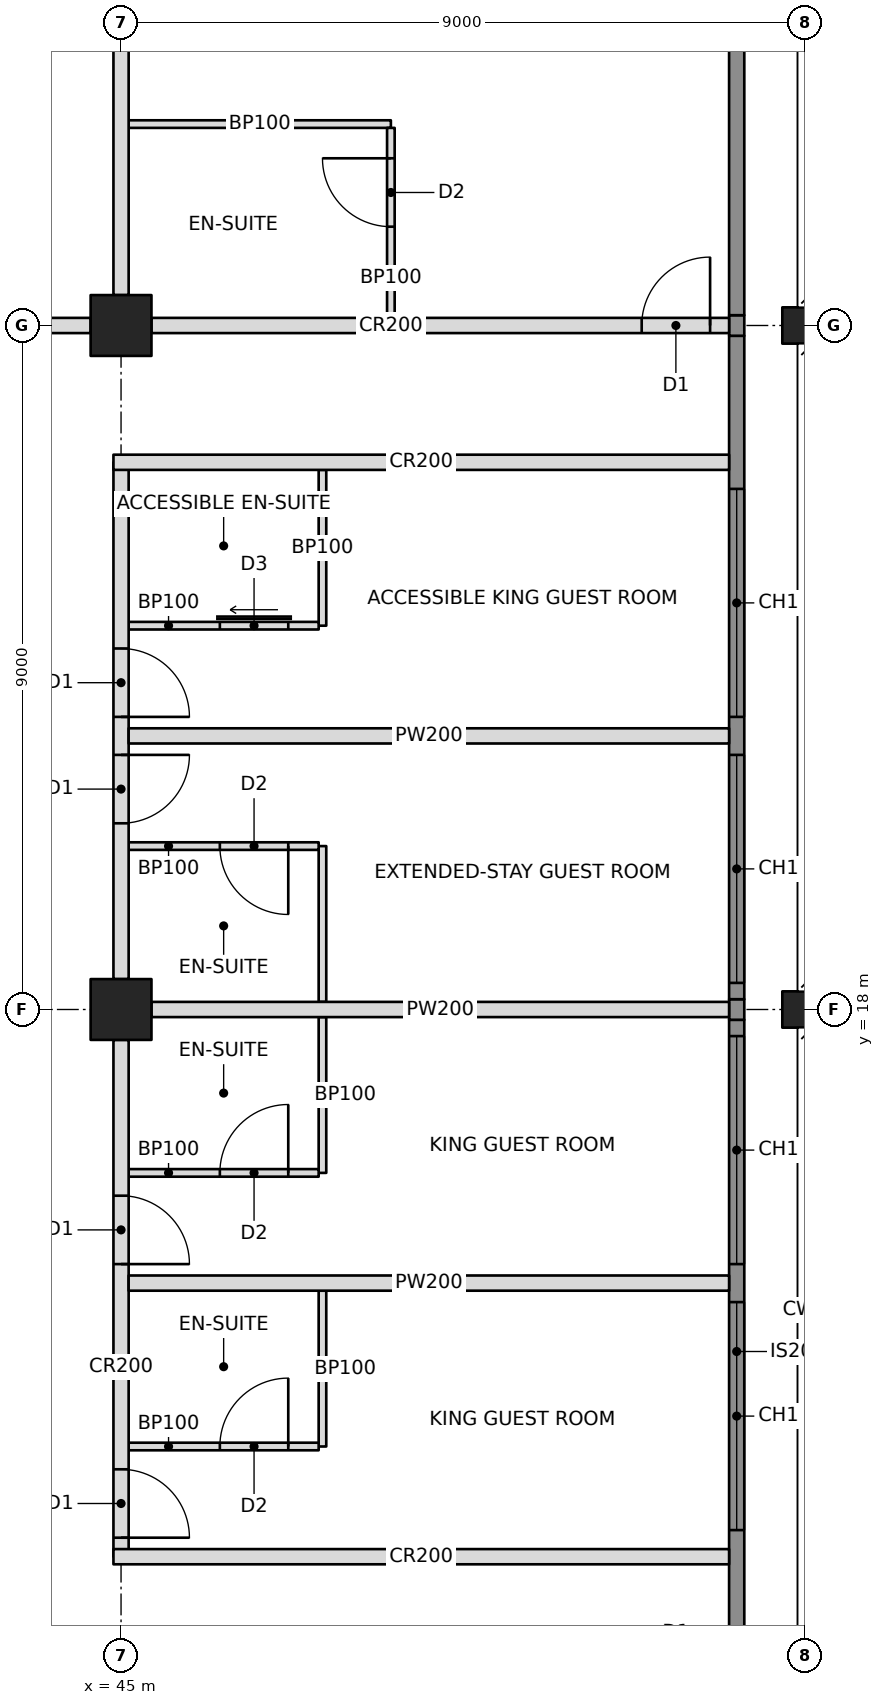
"""IFC4 building model, lengths in metres.
Left out: names, types, materials, properties, quantities, classifications, styles, units other than length and angle.
Written with IfcOpenShell. Run it as: python <this file> out.ifc"""

import sys

from ifc_helpers import new_model, si_unit, direction, frame, frame_2d, origin, origin_2d, place, context, subcontext, project, spatial, rectangle, hollow_rectangle, i_section, extrude, element, fill, save


model = new_model("IFC4")
c1 = context("Model", 3, precision=1e-05, world=origin(), true_north=direction((0.0, 1.0)))
c2 = subcontext(c1, "Body", "Model", "MODEL_VIEW")
j1 = project(units=[si_unit("LENGTHUNIT", "METRE"), si_unit("PLANEANGLEUNIT", "RADIAN")], contexts=[c1])
p1 = place(None, origin())
s1 = spatial("IfcSite", under=j1, at=p1, CompositionType="ELEMENT")
p2 = place(p1, origin())
s2 = spatial("IfcBuilding", under=s1, at=p2, CompositionType="ELEMENT")
p3 = place(p2, frame((0.0, 0.0, 51.8)))
s3 = spatial("IfcBuildingStorey", under=s2, at=p3, CompositionType="ELEMENT", Elevation=51.8)
for number, where, z_axis, x_axis in (
    (1, (45.0, 18.0, 0.0), (0.0, 0.0, 1.0), (0.0, 1.0, 0.0)),
    (2, (45.0, 27.0, 0.0), (0.0, 0.0, 1.0), (0.0, 1.0, 0.0)),
):
    element("IfcColumn", number, at=place(p3, frame(where, z_axis=z_axis, x_axis=x_axis)), inside=s3, PredefinedType="COLUMN", context=c2, shape_type="SweptSolid", body=[
        extrude(hollow_rectangle(XDim=0.8, YDim=0.8, WallThickness=0.1, at=origin_2d()), origin(), (0.0, 0.0, 1.0), 3.4),
    ])
for number, where, z_axis, x_axis in (
    (3, (54.0, 18.0, 0.0), (0.0, 0.0, 1.0), (0.0, 1.0, 0.0)),
    (4, (54.0, 27.0, 0.0), (0.0, 0.0, 1.0), (0.0, 1.0, 0.0)),
):
    element("IfcColumn", number, at=place(p3, frame(where, z_axis=z_axis, x_axis=x_axis)), inside=s3, PredefinedType="COLUMN", context=c2, shape_type="SweptSolid", body=[
        extrude(i_section(OverallWidth=0.478, OverallDepth=0.599, WebThickness=0.1, FlangeThickness=0.14, at=origin_2d()), origin(), (0.0, 0.0, 1.0), 3.4),
    ])
p4 = place(p3, frame((36.4, 27.0, 0.0), z_axis=(0.0, 0.0, 1.0), x_axis=(1.0, 0.0, 0.0)))
e5 = element("IfcWall", 5, at=p4, inside=s3, PredefinedType="PARTITIONING", context=c2, shape_type="SweptSolid", body=[
    extrude(rectangle(XDim=8.2, YDim=0.2, at=frame_2d((4.1, 0.0))), origin(), (0.0, 0.0, 1.0), 2.438),
])
p5 = place(p4, frame((4.35, 0.0, 0.0)))
e6 = element("IfcOpeningElement", 6, at=p5, cuts=e5, PredefinedType="OPENING", context=c2, shape_type="SweptSolid", body=[
    extrude(rectangle(XDim=1.0, YDim=2.1, at=frame_2d((0.5, 1.05))), frame((0.0, 0.11, 0.0), z_axis=(0.0, -1.0, 0.0), x_axis=(1.0, 0.0, 0.0)), (0.0, 0.0, 1.0), 0.22),
])
p6 = place(p3, frame((45.4, 27.0, 0.0), z_axis=(0.0, 0.0, 1.0), x_axis=(1.0, 0.0, 0.0)))
e7 = element("IfcWall", 7, at=p6, inside=s3, PredefinedType="PARTITIONING", context=c2, shape_type="SweptSolid", body=[
    extrude(rectangle(XDim=7.6, YDim=0.2, at=frame_2d((3.8, 0.0))), origin(), (0.0, 0.0, 1.0), 2.438),
])
p7 = place(p6, frame((6.45, 0.0, 0.0)))
e8 = element("IfcOpeningElement", 8, at=p7, cuts=e7, PredefinedType="OPENING", context=c2, shape_type="SweptSolid", body=[
    extrude(rectangle(XDim=0.9, YDim=2.1, at=frame_2d((0.45, 1.05))), frame((0.0, 0.11, 0.0), z_axis=(0.0, -1.0, 0.0), x_axis=(1.0, 0.0, 0.0)), (0.0, 0.0, 1.0), 0.22),
])
p8 = place(p3, frame((45.0, 10.8, 0.0), z_axis=(0.0, 0.0, 1.0), x_axis=(0.0, 1.0, 0.0)))
e9 = element("IfcWall", 9, at=p8, inside=s3, PredefinedType="PARTITIONING", context=c2, shape_type="SweptSolid", body=[
    extrude(rectangle(XDim=6.8, YDim=0.2, at=frame_2d((3.4, 0.0))), origin(), (0.0, 0.0, 1.0), 2.438),
])
p9 = place(p8, frame((0.25, 0.0, 0.0)))
e10 = element("IfcOpeningElement", 10, at=p9, cuts=e9, PredefinedType="OPENING", context=c2, shape_type="SweptSolid", body=[
    extrude(rectangle(XDim=0.9, YDim=2.1, at=frame_2d((0.45, 1.05))), frame((0.0, 0.11, 0.0), z_axis=(0.0, -1.0, 0.0), x_axis=(1.0, 0.0, 0.0)), (0.0, 0.0, 1.0), 0.22),
])
p10 = place(p8, frame((3.85, 0.0, 0.0)))
e11 = element("IfcOpeningElement", 11, at=p10, cuts=e9, PredefinedType="OPENING", context=c2, shape_type="SweptSolid", body=[
    extrude(rectangle(XDim=0.9, YDim=2.1, at=frame_2d((0.45, 1.05))), frame((0.0, 0.11, 0.0), z_axis=(0.0, -1.0, 0.0), x_axis=(1.0, 0.0, 0.0)), (0.0, 0.0, 1.0), 0.22),
])
p11 = place(p3, frame((45.0, 18.4, 0.0), z_axis=(0.0, 0.0, 1.0), x_axis=(0.0, 1.0, 0.0)))
e12 = element("IfcWall", 12, at=p11, inside=s3, PredefinedType="PARTITIONING", context=c2, shape_type="SweptSolid", body=[
    extrude(rectangle(XDim=6.8, YDim=0.2, at=frame_2d((3.4, 0.0))), origin(), (0.0, 0.0, 1.0), 2.438),
])
p12 = place(p11, frame((2.05, 0.0, 0.0)))
e13 = element("IfcOpeningElement", 13, at=p12, cuts=e12, PredefinedType="OPENING", context=c2, shape_type="SweptSolid", body=[
    extrude(rectangle(XDim=0.9, YDim=2.1, at=frame_2d((0.45, 1.05))), frame((0.0, 0.11, 0.0), z_axis=(0.0, -1.0, 0.0), x_axis=(1.0, 0.0, 0.0)), (0.0, 0.0, 1.0), 0.22),
])
p13 = place(p11, frame((3.45, 0.0, 0.0)))
e14 = element("IfcOpeningElement", 14, at=p13, cuts=e12, PredefinedType="OPENING", context=c2, shape_type="SweptSolid", body=[
    extrude(rectangle(XDim=0.9, YDim=2.1, at=frame_2d((0.45, 1.05))), frame((0.0, 0.11, 0.0), z_axis=(0.0, -1.0, 0.0), x_axis=(1.0, 0.0, 0.0)), (0.0, 0.0, 1.0), 0.22),
])
for number, where, z_axis, x_axis in (
    (15, (44.9, 10.8, 0.0), (0.0, 0.0, 1.0), (1.0, 0.0, 0.0)),
    (16, (44.9, 25.2, 0.0), (0.0, 0.0, 1.0), (1.0, 0.0, 0.0)),
):
    element("IfcWall", number, at=place(p3, frame(where, z_axis=z_axis, x_axis=x_axis)), inside=s3, PredefinedType="PARTITIONING", context=c2, shape_type="SweptSolid", body=[
        extrude(rectangle(XDim=8.1, YDim=0.2, at=frame_2d((4.05, 0.0))), origin(), (0.0, 0.0, 1.0), 2.438),
    ])
p14 = place(p3, frame((45.0, 27.4, 0.0), z_axis=(0.0, 0.0, 1.0), x_axis=(0.0, 1.0, 0.0)))
e17 = element("IfcWall", 17, at=p14, inside=s3, PredefinedType="PARTITIONING", context=c2, shape_type="SweptSolid", body=[
    extrude(rectangle(XDim=7.6, YDim=0.2, at=frame_2d((3.8, 0.0))), origin(), (0.0, 0.0, 1.0), 2.438),
])
p15 = place(p3, frame((45.1, 29.65, 0.0), z_axis=(0.0, 0.0, 1.0), x_axis=(1.0, 0.0, 0.0)))
e18 = element("IfcWall", 18, at=p15, inside=s3, PredefinedType="PARTITIONING", context=c2, shape_type="SweptSolid", body=[
    extrude(rectangle(XDim=3.45, YDim=0.1, at=frame_2d((1.725, 0.0))), origin(), (0.0, 0.0, 1.0), 2.438),
])
p16 = place(p3, frame((48.55, 27.1, 0.0), z_axis=(0.0, 0.0, 1.0), x_axis=(0.0, 1.0, 0.0)))
e19 = element("IfcWall", 19, at=p16, inside=s3, PredefinedType="PARTITIONING", context=c2, shape_type="SweptSolid", body=[
    extrude(rectangle(XDim=2.5, YDim=0.1, at=frame_2d((1.25, 0.0))), origin(), (0.0, 0.0, 1.0), 2.438),
])
p17 = place(p16, frame((1.2, 0.0, 0.0)))
e20 = element("IfcOpeningElement", 20, at=p17, cuts=e19, PredefinedType="OPENING", context=c2, shape_type="SweptSolid", body=[
    extrude(rectangle(XDim=0.9, YDim=2.1, at=frame_2d((0.45, 1.05))), frame((0.0, 0.06, 0.0), z_axis=(0.0, -1.0, 0.0), x_axis=(1.0, 0.0, 0.0)), (0.0, 0.0, 1.0), 0.12),
])
p18 = place(p3, frame((45.1, 14.4, 0.0), z_axis=(0.0, 0.0, 1.0), x_axis=(1.0, 0.0, 0.0)))
e21 = element("IfcWall", 21, at=p18, inside=s3, PredefinedType="PARTITIONING", context=c2, shape_type="SweptSolid", body=[
    extrude(rectangle(XDim=7.9, YDim=0.2, at=frame_2d((3.95, 0.0))), origin(), (0.0, 0.0, 1.0), 2.438),
])
p19 = place(p3, frame((45.4, 18.0, 0.0), z_axis=(0.0, 0.0, 1.0), x_axis=(1.0, 0.0, 0.0)))
e22 = element("IfcWall", 22, at=p19, inside=s3, PredefinedType="PARTITIONING", context=c2, shape_type="SweptSolid", body=[
    extrude(rectangle(XDim=7.6, YDim=0.2, at=frame_2d((3.8, 0.0))), origin(), (0.0, 0.0, 1.0), 2.438),
])
p20 = place(p3, frame((45.1, 21.6, 0.0), z_axis=(0.0, 0.0, 1.0), x_axis=(1.0, 0.0, 0.0)))
e23 = element("IfcWall", 23, at=p20, inside=s3, PredefinedType="PARTITIONING", context=c2, shape_type="SweptSolid", body=[
    extrude(rectangle(XDim=7.9, YDim=0.2, at=frame_2d((3.95, 0.0))), origin(), (0.0, 0.0, 1.0), 2.438),
])
p21 = place(p3, frame((47.65, 12.25, 0.0), z_axis=(0.0, 0.0, 1.0), x_axis=(0.0, 1.0, 0.0)))
e24 = element("IfcWall", 24, at=p21, inside=s3, PredefinedType="PARTITIONING", context=c2, shape_type="SweptSolid", body=[
    extrude(rectangle(XDim=2.05, YDim=0.1, at=frame_2d((1.025, 0.0))), origin(), (0.0, 0.0, 1.0), 3.2),
])
p22 = place(p3, frame((45.1, 12.25, 0.0), z_axis=(0.0, 0.0, 1.0), x_axis=(1.0, 0.0, 0.0)))
e25 = element("IfcWall", 25, at=p22, inside=s3, PredefinedType="PARTITIONING", context=c2, shape_type="SweptSolid", body=[
    extrude(rectangle(XDim=2.5, YDim=0.1, at=frame_2d((1.25, 0.0))), origin(), (0.0, 0.0, 1.0), 2.438),
])
p23 = place(p22, frame((1.2, 0.0, 0.0)))
e26 = element("IfcOpeningElement", 26, at=p23, cuts=e25, PredefinedType="OPENING", context=c2, shape_type="SweptSolid", body=[
    extrude(rectangle(XDim=0.9, YDim=2.1, at=frame_2d((0.45, 1.05))), frame((0.0, 0.06, 0.0), z_axis=(0.0, -1.0, 0.0), x_axis=(1.0, 0.0, 0.0)), (0.0, 0.0, 1.0), 0.12),
])
p24 = place(p3, frame((47.65, 15.85, 0.0), z_axis=(0.0, 0.0, 1.0), x_axis=(0.0, 1.0, 0.0)))
e27 = element("IfcWall", 27, at=p24, inside=s3, PredefinedType="PARTITIONING", context=c2, shape_type="SweptSolid", body=[
    extrude(rectangle(XDim=2.05, YDim=0.1, at=frame_2d((1.025, 0.0))), origin(), (0.0, 0.0, 1.0), 2.438),
])
p25 = place(p3, frame((45.1, 15.85, 0.0), z_axis=(0.0, 0.0, 1.0), x_axis=(1.0, 0.0, 0.0)))
e28 = element("IfcWall", 28, at=p25, inside=s3, PredefinedType="PARTITIONING", context=c2, shape_type="SweptSolid", body=[
    extrude(rectangle(XDim=2.5, YDim=0.1, at=frame_2d((1.25, 0.0))), origin(), (0.0, 0.0, 1.0), 2.438),
])
p26 = place(p25, frame((1.2, 0.0, 0.0)))
e29 = element("IfcOpeningElement", 29, at=p26, cuts=e28, PredefinedType="OPENING", context=c2, shape_type="SweptSolid", body=[
    extrude(rectangle(XDim=0.9, YDim=2.1, at=frame_2d((0.45, 1.05))), frame((0.0, 0.06, 0.0), z_axis=(0.0, -1.0, 0.0), x_axis=(1.0, 0.0, 0.0)), (0.0, 0.0, 1.0), 0.12),
])
p27 = place(p3, frame((47.65, 18.1, 0.0), z_axis=(0.0, 0.0, 1.0), x_axis=(0.0, 1.0, 0.0)))
e30 = element("IfcWall", 30, at=p27, inside=s3, PredefinedType="PARTITIONING", context=c2, shape_type="SweptSolid", body=[
    extrude(rectangle(XDim=2.05, YDim=0.1, at=frame_2d((1.025, 0.0))), origin(), (0.0, 0.0, 1.0), 2.438),
])
p28 = place(p3, frame((45.1, 20.15, 0.0), z_axis=(0.0, 0.0, 1.0), x_axis=(1.0, 0.0, 0.0)))
e31 = element("IfcWall", 31, at=p28, inside=s3, PredefinedType="PARTITIONING", context=c2, shape_type="SweptSolid", body=[
    extrude(rectangle(XDim=2.5, YDim=0.1, at=frame_2d((1.25, 0.0))), origin(), (0.0, 0.0, 1.0), 2.438),
])
p29 = place(p28, frame((1.2, 0.0, 0.0)))
e32 = element("IfcOpeningElement", 32, at=p29, cuts=e31, PredefinedType="OPENING", context=c2, shape_type="SweptSolid", body=[
    extrude(rectangle(XDim=0.9, YDim=2.1, at=frame_2d((0.45, 1.05))), frame((0.0, 0.06, 0.0), z_axis=(0.0, -1.0, 0.0), x_axis=(1.0, 0.0, 0.0)), (0.0, 0.0, 1.0), 0.12),
])
p30 = place(p3, frame((47.65, 23.05, 0.0), z_axis=(0.0, 0.0, 1.0), x_axis=(0.0, 1.0, 0.0)))
e33 = element("IfcWall", 33, at=p30, inside=s3, PredefinedType="PARTITIONING", context=c2, shape_type="SweptSolid", body=[
    extrude(rectangle(XDim=2.05, YDim=0.1, at=frame_2d((1.025, 0.0))), origin(), (0.0, 0.0, 1.0), 3.2),
])
p31 = place(p3, frame((45.1, 23.05, 0.0), z_axis=(0.0, 0.0, 1.0), x_axis=(1.0, 0.0, 0.0)))
e34 = element("IfcWall", 34, at=p31, inside=s3, PredefinedType="PARTITIONING", context=c2, shape_type="SweptSolid", body=[
    extrude(rectangle(XDim=2.5, YDim=0.1, at=frame_2d((1.25, 0.0))), origin(), (0.0, 0.0, 1.0), 2.438),
])
p32 = place(p31, frame((1.2, 0.0, 0.0)))
e35 = element("IfcOpeningElement", 35, at=p32, cuts=e34, PredefinedType="OPENING", context=c2, shape_type="SweptSolid", body=[
    extrude(rectangle(XDim=0.9, YDim=2.1, at=frame_2d((0.45, 1.05))), frame((0.0, 0.06, 0.0), z_axis=(0.0, -1.0, 0.0), x_axis=(1.0, 0.0, 0.0)), (0.0, 0.0, 1.0), 0.12),
])
p33 = place(p3, frame((53.1, 9.135, 0.0), z_axis=(0.0, 0.0, 1.0), x_axis=(0.0, 1.0, 0.0)))
e36 = element("IfcWall", 36, at=p33, inside=s3, PredefinedType="SOLIDWALL", context=c2, shape_type="SweptSolid", body=[
    extrude(rectangle(XDim=8.729, YDim=0.2, at=frame_2d((4.365, 0.0))), origin(), (0.0, 0.0, 1.0), 3.2),
])
p34 = place(p33, frame((2.015, 0.0, 0.6)))
e37 = element("IfcOpeningElement", 37, at=p34, cuts=e36, PredefinedType="OPENING", context=c2, shape_type="SweptSolid", body=[
    extrude(rectangle(XDim=3.0, YDim=2.2, at=frame_2d((1.5, 1.1))), frame((0.0, 0.11, 0.0), z_axis=(0.0, -1.0, 0.0), x_axis=(1.0, 0.0, 0.0)), (0.0, 0.0, 1.0), 0.22),
])
p35 = place(p33, frame((5.515, 0.0, 0.6)))
e38 = element("IfcOpeningElement", 38, at=p35, cuts=e36, PredefinedType="OPENING", context=c2, shape_type="SweptSolid", body=[
    extrude(rectangle(XDim=3.0, YDim=2.2, at=frame_2d((1.5, 1.1))), frame((0.0, 0.11, 0.0), z_axis=(0.0, -1.0, 0.0), x_axis=(1.0, 0.0, 0.0)), (0.0, 0.0, 1.0), 0.22),
])
p36 = place(p3, frame((53.1, 17.865, 0.0), z_axis=(0.0, 0.0, 1.0), x_axis=(0.0, 1.0, 0.0)))
e39 = element("IfcWall", 39, at=p36, inside=s3, PredefinedType="SOLIDWALL", context=c2, shape_type="SweptSolid", body=[
    extrude(rectangle(XDim=0.271, YDim=0.2, at=frame_2d((0.135, 0.0))), origin(), (0.0, 0.0, 1.0), 2.438),
])
p37 = place(p3, frame((53.1, 18.135, 0.0), z_axis=(0.0, 0.0, 1.0), x_axis=(0.0, 1.0, 0.0)))
e40 = element("IfcWall", 40, at=p37, inside=s3, PredefinedType="SOLIDWALL", context=c2, shape_type="SweptSolid", body=[
    extrude(rectangle(XDim=8.729, YDim=0.2, at=frame_2d((4.365, 0.0))), origin(), (0.0, 0.0, 1.0), 3.2),
])
p38 = place(p37, frame((0.215, 0.0, 0.6)))
e41 = element("IfcOpeningElement", 41, at=p38, cuts=e40, PredefinedType="OPENING", context=c2, shape_type="SweptSolid", body=[
    extrude(rectangle(XDim=3.0, YDim=2.2, at=frame_2d((1.5, 1.1))), frame((0.0, 0.11, 0.0), z_axis=(0.0, -1.0, 0.0), x_axis=(1.0, 0.0, 0.0)), (0.0, 0.0, 1.0), 0.22),
])
p39 = place(p37, frame((3.715, 0.0, 0.6)))
e42 = element("IfcOpeningElement", 42, at=p39, cuts=e40, PredefinedType="OPENING", context=c2, shape_type="SweptSolid", body=[
    extrude(rectangle(XDim=3.0, YDim=2.2, at=frame_2d((1.5, 1.1))), frame((0.0, 0.11, 0.0), z_axis=(0.0, -1.0, 0.0), x_axis=(1.0, 0.0, 0.0)), (0.0, 0.0, 1.0), 0.22),
])
p40 = place(p3, frame((53.1, 26.865, 0.0), z_axis=(0.0, 0.0, 1.0), x_axis=(0.0, 1.0, 0.0)))
e43 = element("IfcWall", 43, at=p40, inside=s3, PredefinedType="SOLIDWALL", context=c2, shape_type="SweptSolid", body=[
    extrude(rectangle(XDim=0.271, YDim=0.2, at=frame_2d((0.135, 0.0))), origin(), (0.0, 0.0, 1.0), 2.438),
])
p41 = place(p3, frame((53.1, 27.135, 0.0), z_axis=(0.0, 0.0, 1.0), x_axis=(0.0, 1.0, 0.0)))
e44 = element("IfcWall", 44, at=p41, inside=s3, PredefinedType="SOLIDWALL", context=c2, shape_type="SweptSolid", body=[
    extrude(rectangle(XDim=4.257, YDim=0.2, at=frame_2d((2.129, 0.0))), origin(), (0.0, 0.0, 1.0), 3.2),
])
p42 = place(p34, origin())
e45 = element("IfcWindow", 45, at=p42, inside=s3, PartitioningType="TRIPLE_PANEL_VERTICAL", PredefinedType="WINDOW", context=c2, shape_type="SweptSolid", body=[
    extrude(rectangle(XDim=3.0, YDim=2.2, at=frame_2d((1.5, 1.1))), frame((0.0, 0.03, 0.0), z_axis=(0.0, -1.0, 0.0), x_axis=(1.0, 0.0, 0.0)), (0.0, 0.0, 1.0), 0.06),
])
fill(e37, e45)
p43 = place(p35, origin())
e46 = element("IfcWindow", 46, at=p43, inside=s3, PartitioningType="TRIPLE_PANEL_VERTICAL", PredefinedType="WINDOW", context=c2, shape_type="SweptSolid", body=[
    extrude(rectangle(XDim=3.0, YDim=2.2, at=frame_2d((1.5, 1.1))), frame((0.0, 0.03, 0.0), z_axis=(0.0, -1.0, 0.0), x_axis=(1.0, 0.0, 0.0)), (0.0, 0.0, 1.0), 0.06),
])
fill(e38, e46)
p44 = place(p38, origin())
e47 = element("IfcWindow", 47, at=p44, inside=s3, PartitioningType="TRIPLE_PANEL_VERTICAL", PredefinedType="WINDOW", context=c2, shape_type="SweptSolid", body=[
    extrude(rectangle(XDim=3.0, YDim=2.2, at=frame_2d((1.5, 1.1))), frame((0.0, 0.03, 0.0), z_axis=(0.0, -1.0, 0.0), x_axis=(1.0, 0.0, 0.0)), (0.0, 0.0, 1.0), 0.06),
])
fill(e41, e47)
p45 = place(p39, origin())
e48 = element("IfcWindow", 48, at=p45, inside=s3, PartitioningType="TRIPLE_PANEL_VERTICAL", PredefinedType="WINDOW", context=c2, shape_type="SweptSolid", body=[
    extrude(rectangle(XDim=3.0, YDim=2.2, at=frame_2d((1.5, 1.1))), frame((0.0, 0.03, 0.0), z_axis=(0.0, -1.0, 0.0), x_axis=(1.0, 0.0, 0.0)), (0.0, 0.0, 1.0), 0.06),
])
fill(e42, e48)
p46 = place(p17, origin())
e49 = element("IfcDoor", 49, at=p46, inside=s3, OperationType="SINGLE_SWING_RIGHT", PredefinedType="DOOR", context=c2, shape_type="SweptSolid", body=[
    extrude(rectangle(XDim=0.9, YDim=2.1, at=frame_2d((0.45, 1.05))), frame((0.0, 0.025, 0.0), z_axis=(0.0, -1.0, 0.0), x_axis=(1.0, 0.0, 0.0)), (0.0, 0.0, 1.0), 0.05),
])
fill(e20, e49)
p47 = place(p7, origin())
e50 = element("IfcDoor", 50, at=p47, inside=s3, OperationType="SINGLE_SWING_RIGHT", PredefinedType="DOOR", context=c2, shape_type="SweptSolid", body=[
    extrude(rectangle(XDim=0.9, YDim=2.1, at=frame_2d((0.45, 1.05))), frame((0.0, 0.025, 0.0), z_axis=(0.0, -1.0, 0.0), x_axis=(1.0, 0.0, 0.0)), (0.0, 0.0, 1.0), 0.05),
])
fill(e8, e50)
p48 = place(p23, origin())
e51 = element("IfcDoor", 51, at=p48, inside=s3, OperationType="SINGLE_SWING_RIGHT", PredefinedType="DOOR", context=c2, shape_type="SweptSolid", body=[
    extrude(rectangle(XDim=0.9, YDim=2.1, at=frame_2d((0.45, 1.05))), frame((0.0, 0.025, 0.0), z_axis=(0.0, -1.0, 0.0), x_axis=(1.0, 0.0, 0.0)), (0.0, 0.0, 1.0), 0.05),
])
fill(e26, e51)
p49 = place(p9, frame((0.9, 0.0, 0.0), z_axis=(0.0, 0.0, 1.0), x_axis=(-1.0, 0.0, 0.0)))
e52 = element("IfcDoor", 52, at=p49, inside=s3, OperationType="SINGLE_SWING_RIGHT", PredefinedType="DOOR", context=c2, shape_type="SweptSolid", body=[
    extrude(rectangle(XDim=0.9, YDim=2.1, at=frame_2d((0.45, 1.05))), frame((0.0, 0.025, 0.0), z_axis=(0.0, -1.0, 0.0), x_axis=(1.0, 0.0, 0.0)), (0.0, 0.0, 1.0), 0.05),
])
fill(e10, e52)
p50 = place(p26, origin())
e53 = element("IfcDoor", 53, at=p50, inside=s3, OperationType="SINGLE_SWING_RIGHT", PredefinedType="DOOR", context=c2, shape_type="SweptSolid", body=[
    extrude(rectangle(XDim=0.9, YDim=2.1, at=frame_2d((0.45, 1.05))), frame((0.0, 0.025, 0.0), z_axis=(0.0, -1.0, 0.0), x_axis=(1.0, 0.0, 0.0)), (0.0, 0.0, 1.0), 0.05),
])
fill(e29, e53)
p51 = place(p10, frame((0.9, 0.0, 0.0), z_axis=(0.0, 0.0, 1.0), x_axis=(-1.0, 0.0, 0.0)))
e54 = element("IfcDoor", 54, at=p51, inside=s3, OperationType="SINGLE_SWING_RIGHT", PredefinedType="DOOR", context=c2, shape_type="SweptSolid", body=[
    extrude(rectangle(XDim=0.9, YDim=2.1, at=frame_2d((0.45, 1.05))), frame((0.0, 0.025, 0.0), z_axis=(0.0, -1.0, 0.0), x_axis=(1.0, 0.0, 0.0)), (0.0, 0.0, 1.0), 0.05),
])
fill(e11, e54)
p52 = place(p29, frame((0.9, 0.0, 0.0), z_axis=(0.0, 0.0, 1.0), x_axis=(-1.0, 0.0, 0.0)))
e55 = element("IfcDoor", 55, at=p52, inside=s3, OperationType="SINGLE_SWING_LEFT", PredefinedType="DOOR", context=c2, shape_type="SweptSolid", body=[
    extrude(rectangle(XDim=0.9, YDim=2.1, at=frame_2d((0.45, 1.05))), frame((0.0, 0.025, 0.0), z_axis=(0.0, -1.0, 0.0), x_axis=(1.0, 0.0, 0.0)), (0.0, 0.0, 1.0), 0.05),
])
fill(e32, e55)
p53 = place(p12, frame((0.9, 0.0, 0.0), z_axis=(0.0, 0.0, 1.0), x_axis=(-1.0, 0.0, 0.0)))
e56 = element("IfcDoor", 56, at=p53, inside=s3, OperationType="SINGLE_SWING_LEFT", PredefinedType="DOOR", context=c2, shape_type="SweptSolid", body=[
    extrude(rectangle(XDim=0.9, YDim=2.1, at=frame_2d((0.45, 1.05))), frame((0.0, 0.025, 0.0), z_axis=(0.0, -1.0, 0.0), x_axis=(1.0, 0.0, 0.0)), (0.0, 0.0, 1.0), 0.05),
])
fill(e13, e56)
p54 = place(p32, origin())
e57 = element("IfcDoor", 57, at=p54, inside=s3, OperationType="SLIDING_TO_LEFT", PredefinedType="DOOR", context=c2, shape_type="SweptSolid", body=[
    extrude(rectangle(XDim=0.9, YDim=2.1, at=frame_2d((0.45, 1.05))), frame((0.0, 0.025, 0.0), z_axis=(0.0, -1.0, 0.0), x_axis=(1.0, 0.0, 0.0)), (0.0, 0.0, 1.0), 0.05),
])
fill(e35, e57)
p55 = place(p13, frame((0.9, 0.0, 0.0), z_axis=(0.0, 0.0, 1.0), x_axis=(-1.0, 0.0, 0.0)))
e58 = element("IfcDoor", 58, at=p55, inside=s3, OperationType="SINGLE_SWING_RIGHT", PredefinedType="DOOR", context=c2, shape_type="SweptSolid", body=[
    extrude(rectangle(XDim=0.9, YDim=2.1, at=frame_2d((0.45, 1.05))), frame((0.0, 0.025, 0.0), z_axis=(0.0, -1.0, 0.0), x_axis=(1.0, 0.0, 0.0)), (0.0, 0.0, 1.0), 0.05),
])
fill(e14, e58)
save(model, sys.argv[1])
